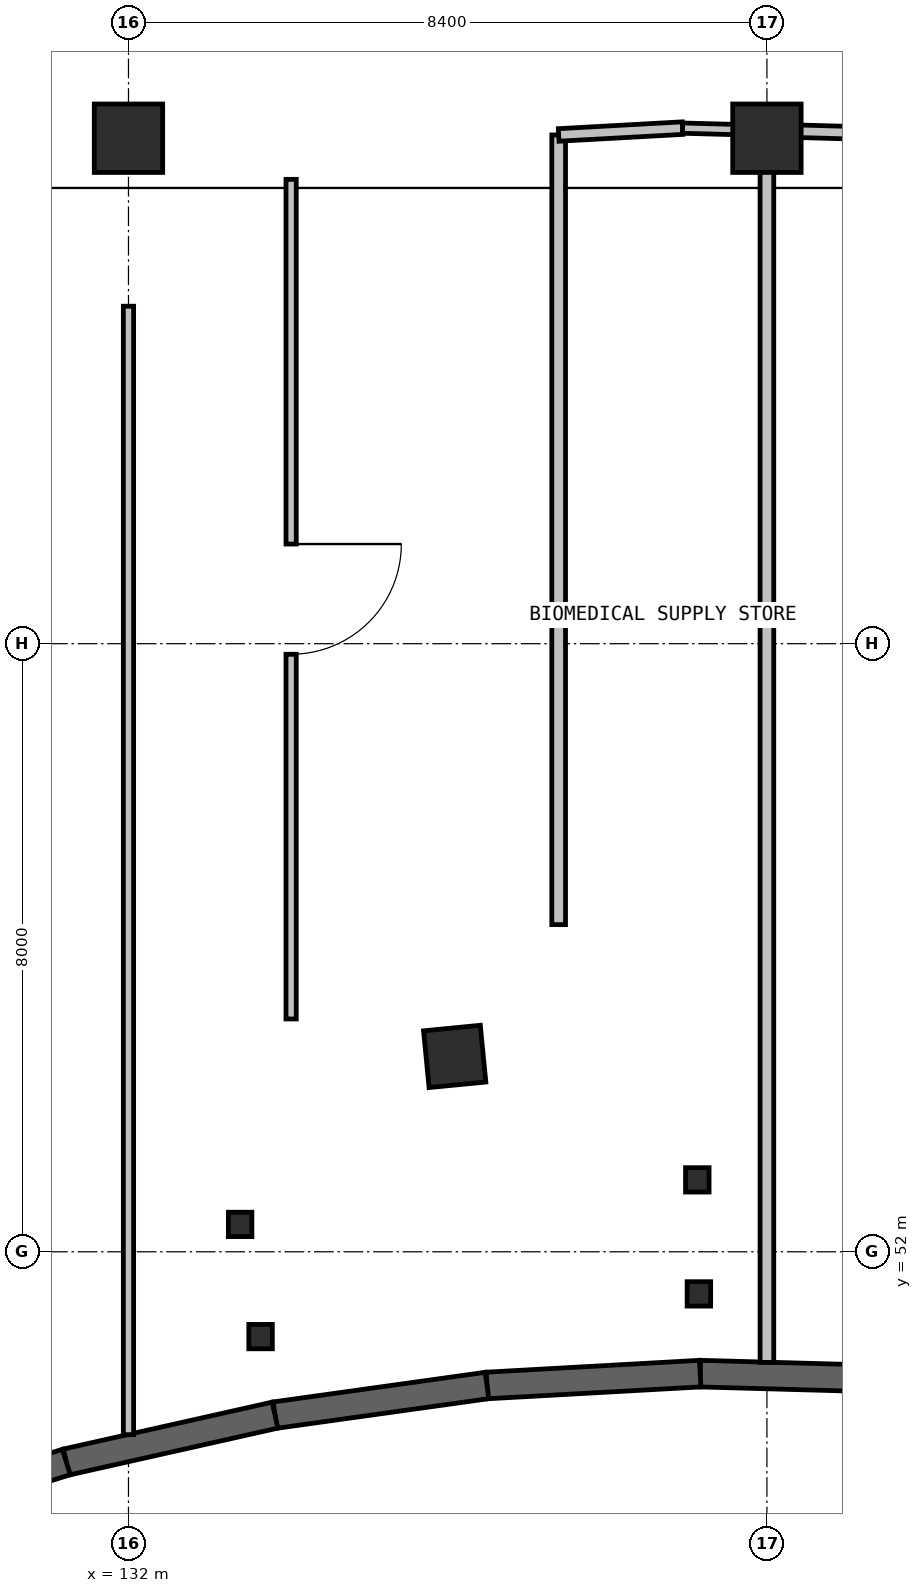
"""IFC4 building model, lengths in metres.
Left out: names, types, materials, properties, quantities, classifications, styles, units other than length and angle.
Written with IfcOpenShell. Run it as: python <this file> out.ifc"""

import sys

from ifc_helpers import new_model, si_unit, direction, frame, frame_2d, origin, origin_2d, place, context, subcontext, project, spatial, rectangle, i_section, extrude, element, fill, save


model = new_model("IFC4")
c1 = context("Model", 3, precision=1e-05, world=origin(), true_north=direction((0.0, 1.0)))
c2 = subcontext(c1, "Body", "Model", "MODEL_VIEW")
j1 = project(units=[si_unit("LENGTHUNIT", "METRE"), si_unit("PLANEANGLEUNIT", "RADIAN")], contexts=[c1])
p1 = place(None, origin())
s1 = spatial("IfcSite", under=j1, at=p1, CompositionType="ELEMENT")
p2 = place(p1, origin())
s2 = spatial("IfcBuilding", under=s1, at=p2, CompositionType="ELEMENT")
p3 = place(p2, frame((0.0, 0.0, -4.8)))
s3 = spatial("IfcBuildingStorey", under=s2, at=p3, CompositionType="ELEMENT", Elevation=-4.8)
for number, where, z_axis, x_axis in (
    (1, (133.469, 52.36, 0.0), (0.0, 0.0, 1.0), (1.0, 0.0, 0.0)),
    (2, (133.738, 50.884, 0.0), (0.0, 0.0, 1.0), (1.0, 0.0, 0.0)),
    (3, (139.484, 52.946, 0.0), (0.0, 0.0, 1.0), (1.0, 0.0, 0.0)),
    (4, (139.505, 51.446, 0.0), (0.0, 0.0, 1.0), (1.0, 0.0, 0.0)),
):
    element("IfcColumn", number, at=place(p3, frame(where, z_axis=z_axis, x_axis=x_axis)), inside=s3, PredefinedType="COLUMN", context=c2, shape_type="SweptSolid", body=[
        extrude(i_section(OverallWidth=0.309, OverallDepth=0.321, WebThickness=0.014, FlangeThickness=0.022, at=origin_2d()), origin(), (0.0, 0.0, 1.0), 4.8),
    ])
for number, where, z_axis, x_axis in (
    (5, (132.0, 66.65, 0.0), (0.0, 0.0, 1.0), (1.0, 0.0, 0.0)),
    (6, (140.4, 66.65, 0.0), (0.0, 0.0, 1.0), (1.0, 0.0, 0.0)),
):
    element("IfcColumn", number, at=place(p3, frame(where, z_axis=z_axis, x_axis=x_axis)), inside=s3, PredefinedType="COLUMN", context=c2, shape_type="SweptSolid", body=[
        extrude(rectangle(XDim=0.9, YDim=0.9, at=origin_2d()), origin(), (0.0, 0.0, 1.0), 4.8),
    ])
p4 = place(p3, frame((136.292, 54.57, 0.0), z_axis=(0.0, 0.0, 1.0), x_axis=(-0.097061786558, 0.995278357843, 0.0)))
e7 = element("IfcColumn", 7, at=p4, inside=s3, PredefinedType="COLUMN", context=c2, shape_type="SweptSolid", body=[
    extrude(rectangle(XDim=0.75, YDim=0.75, at=origin_2d()), origin(), (0.0, 0.0, 1.0), 4.8),
])
p5 = place(p3, frame((142.335, 50.319, 0.0), z_axis=(0.0, 0.0, 1.0), x_axis=(-0.999616958311, 0.027675560641, 0.0)))
e8 = element("IfcWall", 8, at=p5, inside=s3, PredefinedType="SHEAR", context=c2, shape_type="SweptSolid", body=[
    extrude(rectangle(XDim=2.814, YDim=0.35, at=frame_2d((1.407, 0.0))), origin(), (0.0, 0.0, 1.0), 4.45),
])
p6 = place(p3, frame((139.522, 50.397, 0.0), z_axis=(0.0, 0.0, 1.0), x_axis=(-0.998456875026, -0.055532591448, 0.0)))
e9 = element("IfcWall", 9, at=p6, inside=s3, PredefinedType="SHEAR", context=c2, shape_type="SweptSolid", body=[
    extrude(rectangle(XDim=2.809, YDim=0.35, at=frame_2d((1.405, 0.0))), origin(), (0.0, 0.0, 1.0), 4.45),
])
p7 = place(p3, frame((136.717, 50.241, 0.0), z_axis=(0.0, 0.0, 1.0), x_axis=(-0.990369818783, -0.138447181425, 0.0)))
e10 = element("IfcWall", 10, at=p7, inside=s3, PredefinedType="SHEAR", context=c2, shape_type="SweptSolid", body=[
    extrude(rectangle(XDim=2.816, YDim=0.35, at=frame_2d((1.408, 0.0))), origin(), (0.0, 0.0, 1.0), 4.45),
])
p8 = place(p3, frame((133.928, 49.851, 0.0), z_axis=(0.0, 0.0, 1.0), x_axis=(-0.975661742294, -0.219281017472, 0.0)))
e11 = element("IfcWall", 11, at=p8, inside=s3, PredefinedType="SHEAR", context=c2, shape_type="SweptSolid", body=[
    extrude(rectangle(XDim=2.815, YDim=0.35, at=frame_2d((1.407, 0.0))), origin(), (0.0, 0.0, 1.0), 4.45),
])
p9 = place(p3, frame((131.182, 49.234, 0.0), z_axis=(0.0, 0.0, 1.0), x_axis=(-0.953973125433, -0.299892107185, 0.0)))
e12 = element("IfcWall", 12, at=p9, inside=s3, PredefinedType="SHEAR", context=c2, shape_type="SweptSolid", body=[
    extrude(rectangle(XDim=2.81, YDim=0.35, at=frame_2d((1.405, 0.0))), origin(), (0.0, 0.0, 1.0), 4.45),
])
p10 = place(p3, frame((132.0, 64.44, 0.0), z_axis=(0.0, 0.0, 1.0), x_axis=(0.0, -1.0, 0.0)))
e13 = element("IfcWall", 13, at=p10, inside=s3, PredefinedType="PARTITIONING", context=c2, shape_type="SweptSolid", body=[
    extrude(rectangle(XDim=14.846, YDim=0.135, at=frame_2d((7.423, 0.0))), origin(), (0.0, 0.0, 1.0), 4.45),
])
p11 = place(p3, frame((134.14, 66.109, 0.0), z_axis=(0.0, 0.0, 1.0), x_axis=(0.0, -1.0, 0.0)))
e14 = element("IfcWall", 14, at=p11, inside=s3, PredefinedType="PARTITIONING", context=c2, shape_type="SweptSolid", body=[
    extrude(rectangle(XDim=11.046, YDim=0.135, at=frame_2d((5.523, 0.0))), origin(), (0.0, 0.0, 1.0), 4.45),
])
p12 = place(p11, frame((4.798, 0.0, 0.0)))
e15 = element("IfcOpeningElement", 15, at=p12, cuts=e14, PredefinedType="OPENING", context=c2, shape_type="SweptSolid", body=[
    extrude(rectangle(XDim=1.45, YDim=2.15, at=frame_2d((0.725, 1.075))), frame((0.0, 0.077, 0.0), z_axis=(0.0, -1.0, 0.0), x_axis=(1.0, 0.0, 0.0)), (0.0, 0.0, 1.0), 0.155),
])
p13 = place(p3, frame((137.66, 56.304, 0.0), z_axis=(0.0, 0.0, 1.0), x_axis=(0.0, 1.0, 0.0)))
e16 = element("IfcWall", 16, at=p13, inside=s3, PredefinedType="PARTITIONING", context=c2, shape_type="SweptSolid", body=[
    extrude(rectangle(XDim=10.389, YDim=0.18, at=frame_2d((5.195, 0.0))), origin(), (0.0, 0.0, 1.0), 4.45),
])
p14 = place(p3, frame((137.66, 66.693, 0.0), z_axis=(0.0, 0.0, 1.0), x_axis=(0.998484643385, 0.055031054181, 0.0)))
e17 = element("IfcWall", 17, at=p14, inside=s3, PredefinedType="PARTITIONING", context=c2, shape_type="SweptSolid", body=[
    extrude(rectangle(XDim=1.633, YDim=0.165, at=frame_2d((0.816, 0.0))), origin(), (0.0, 0.0, 1.0), 3.6),
])
p15 = place(p3, frame((139.29, 66.783, 0.0), z_axis=(0.0, 0.0, 1.0), x_axis=(0.999634166902, -0.027046854934, 0.0)))
e18 = element("IfcWall", 18, at=p15, inside=s3, PredefinedType="PARTITIONING", context=c2, shape_type="SweptSolid", body=[
    extrude(rectangle(XDim=1.11, YDim=0.135, at=frame_2d((0.555, 0.0))), origin(), (0.0, 0.0, 1.0), 3.6),
])
p16 = place(p3, frame((140.4, 66.753, 0.0), z_axis=(0.0, 0.0, 1.0), x_axis=(0.0, -1.0, 0.0)))
e19 = element("IfcWall", 19, at=p16, inside=s3, PredefinedType="PARTITIONING", context=c2, shape_type="SweptSolid", body=[
    extrude(rectangle(XDim=16.208, YDim=0.18, at=frame_2d((8.104, 0.0))), origin(), (0.0, 0.0, 1.0), 4.45),
])
p17 = place(p3, frame((140.486, 66.751, 0.0), z_axis=(0.0, 0.0, 1.0), x_axis=(0.999611444096, -0.02787401714, 0.0)))
e20 = element("IfcWall", 20, at=p17, inside=s3, PredefinedType="PARTITIONING", context=c2, shape_type="SweptSolid", body=[
    extrude(rectangle(XDim=2.978, YDim=0.165, at=frame_2d((1.489, 0.0))), origin(), (0.0, 0.0, 1.0), 3.6),
])
p18 = place(p17, frame((1.644, 0.0, 0.0)))
e21 = element("IfcOpeningElement", 21, at=p18, cuts=e20, PredefinedType="OPENING", context=c2, shape_type="SweptSolid", body=[
    extrude(rectangle(XDim=1.0, YDim=2.15, at=frame_2d((0.5, 1.075))), frame((0.0, 0.093, 0.0), z_axis=(0.0, -1.0, 0.0), x_axis=(1.0, 0.0, 0.0)), (0.0, 0.0, 1.0), 0.185),
])
p19 = place(p12, origin())
e22 = element("IfcDoor", 22, at=p19, inside=s3, OperationType="SINGLE_SWING_LEFT", PredefinedType="DOOR", context=c2, shape_type="SweptSolid", body=[
    extrude(rectangle(XDim=1.45, YDim=2.15, at=frame_2d((0.725, 1.075))), frame((0.0, 0.025, 0.0), z_axis=(0.0, -1.0, 0.0), x_axis=(1.0, 0.0, 0.0)), (0.0, 0.0, 1.0), 0.05),
])
fill(e15, e22)
save(model, sys.argv[1])
